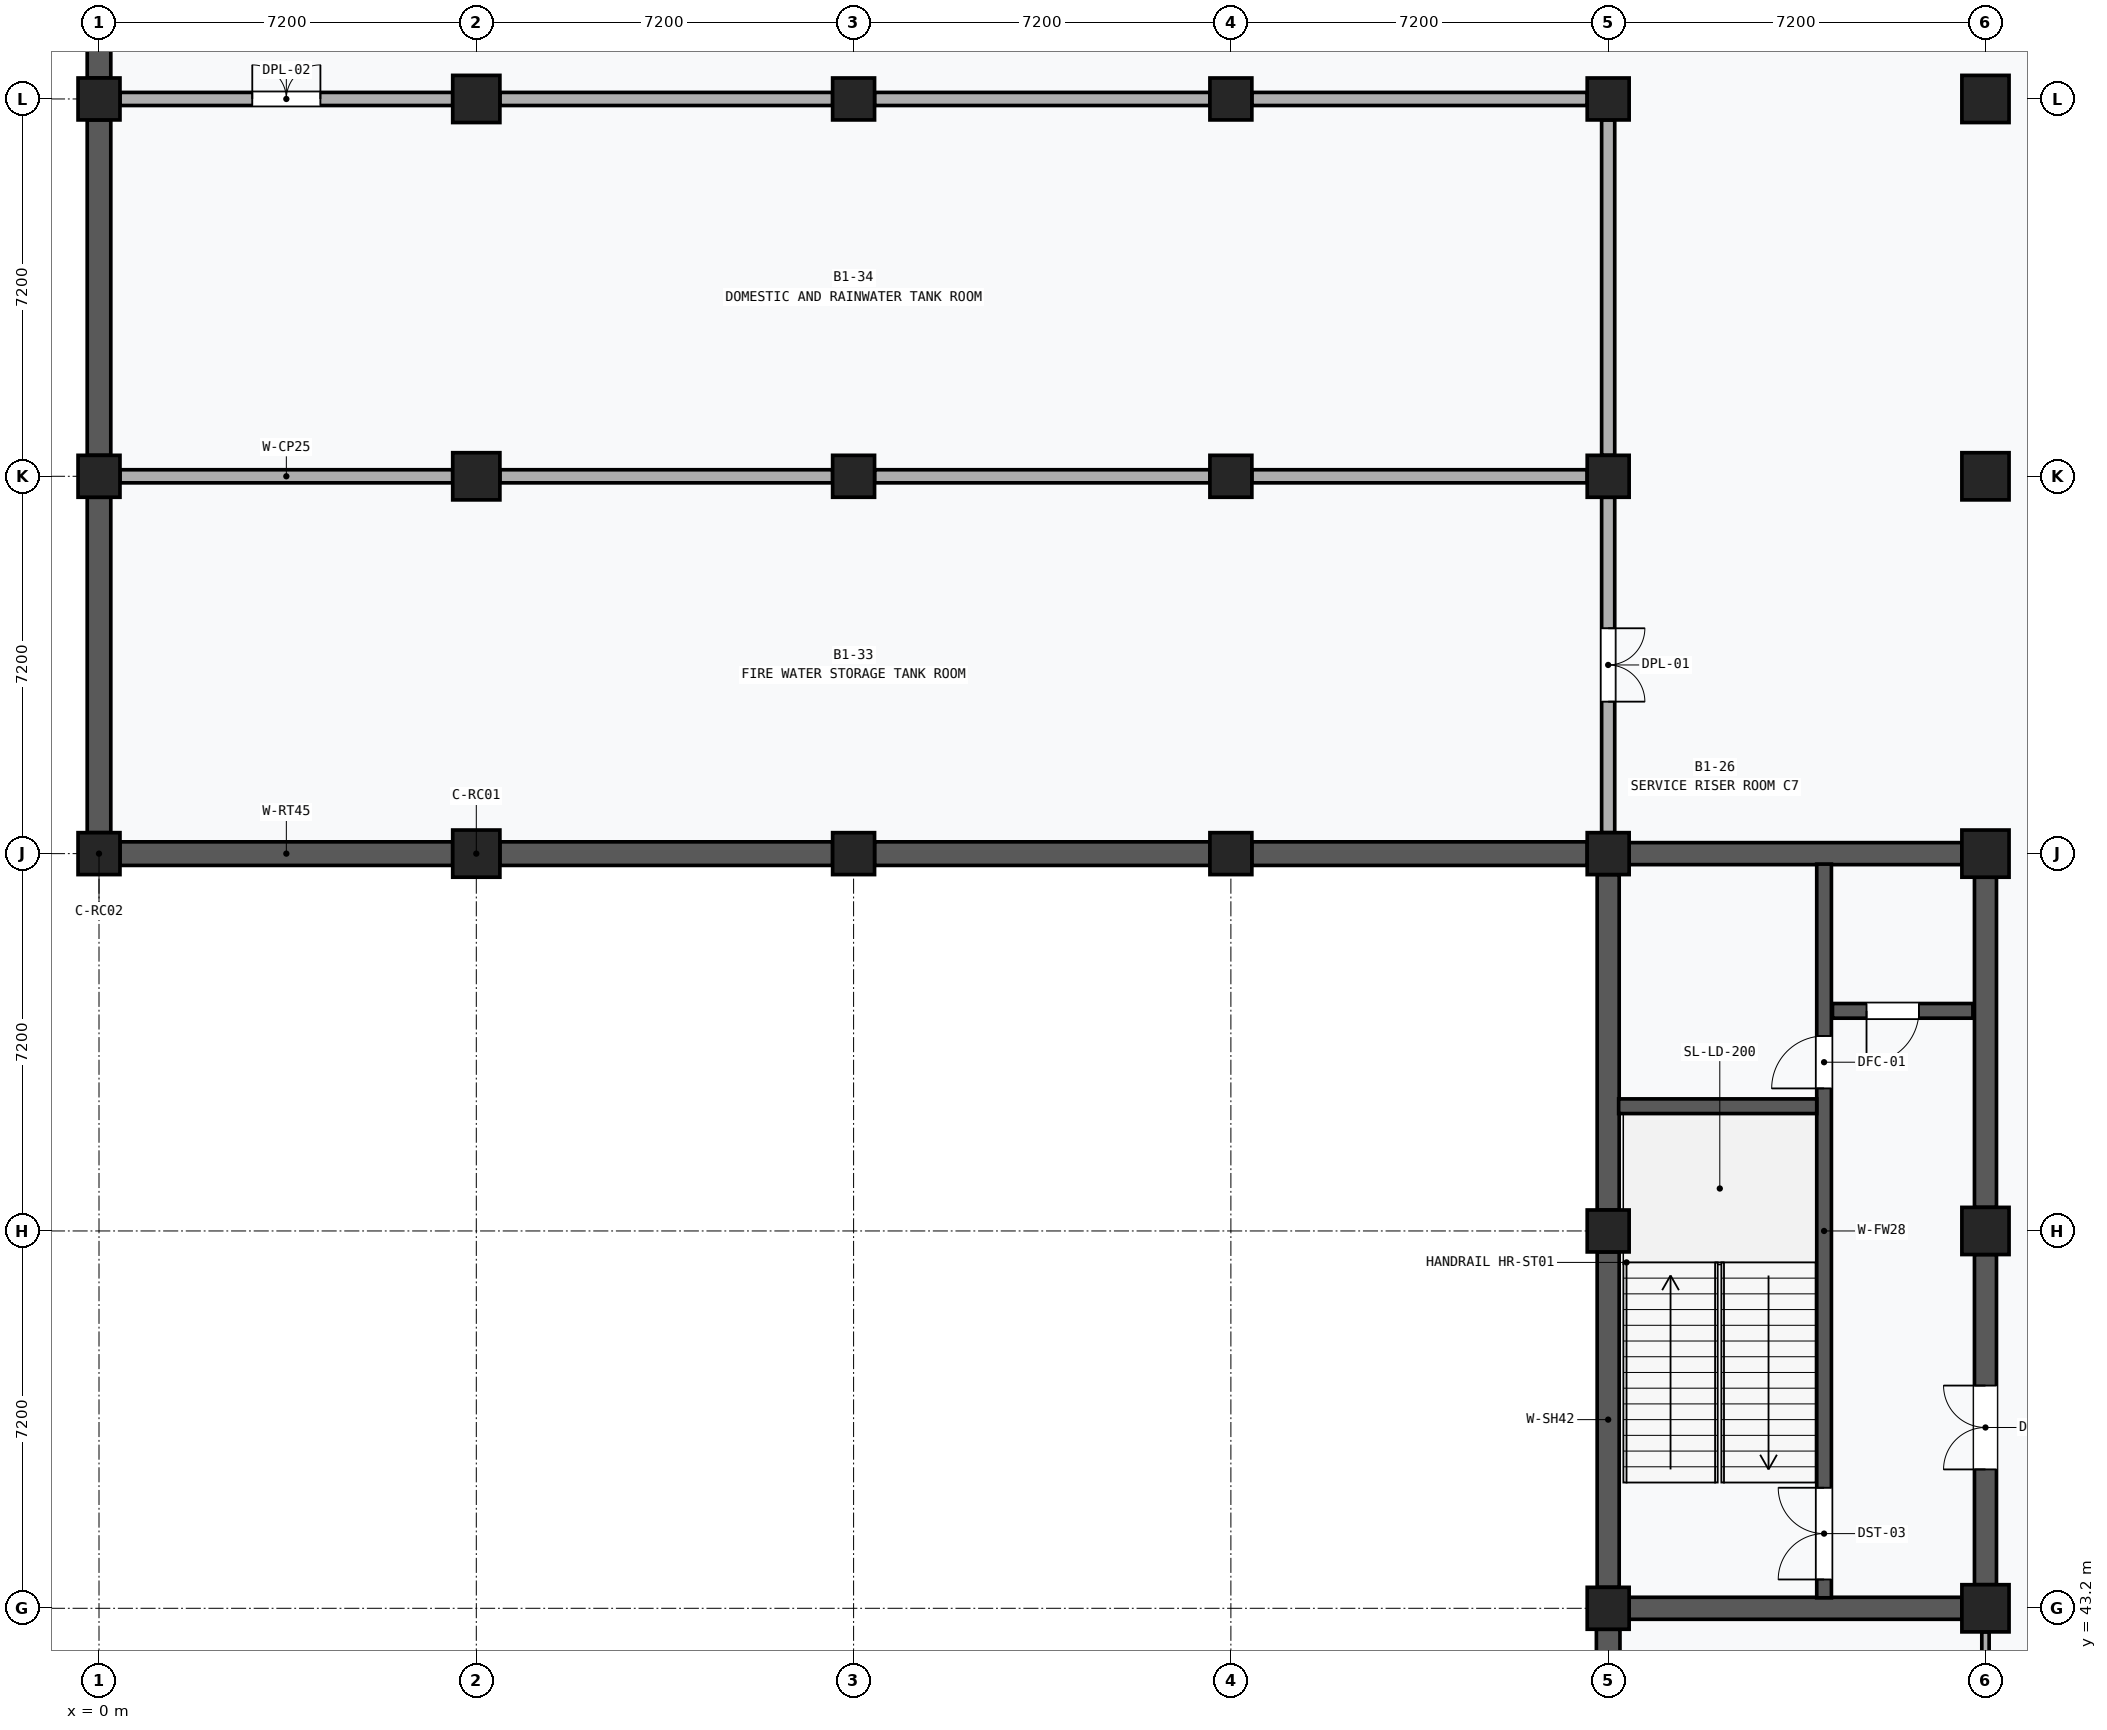
"""IFC4 building model, lengths in metres.
Left out: names, types, materials, properties, quantities, classifications, styles, units other than length and angle.
Written with IfcOpenShell. Run it as: python <this file> out.ifc"""

import sys

from ifc_helpers import new_model, si_unit, direction, frame, frame_2d, origin, origin_2d, place, context, subcontext, project, spatial, rectangle, extrude, element, fill, save


model = new_model("IFC4")
c1 = context("Model", 3, precision=1e-05, world=origin(), true_north=direction((0.0, 1.0)))
c2 = subcontext(c1, "Body", "Model", "MODEL_VIEW")
j1 = project(units=[si_unit("LENGTHUNIT", "METRE"), si_unit("PLANEANGLEUNIT", "RADIAN")], contexts=[c1])
p1 = place(None, origin())
s1 = spatial("IfcSite", under=j1, at=p1, CompositionType="ELEMENT")
p2 = place(p1, origin())
s2 = spatial("IfcBuilding", under=s1, at=p2, CompositionType="ELEMENT")
p3 = place(p2, frame((0.0, 0.0, -4.5)))
s3 = spatial("IfcBuildingStorey", under=s2, at=p3, CompositionType="ELEMENT", Elevation=-4.5)
for number, where, z_axis, x_axis in (
    (1, (0.0, 57.6, 0.0), (0.0, 0.0, 1.0), (1.0, 0.0, 0.0)),
    (2, (0.0, 64.8, 0.0), (0.0, 0.0, 1.0), (1.0, 0.0, 0.0)),
    (3, (0.0, 72.0, 0.0), (0.0, 0.0, 1.0), (1.0, 0.0, 0.0)),
):
    element("IfcColumn", number, at=place(p3, frame(where, z_axis=z_axis, x_axis=x_axis)), inside=s3, PredefinedType="COLUMN", context=c2, shape_type="SweptSolid", body=[
        extrude(rectangle(XDim=0.8, YDim=0.8, at=origin_2d()), origin(), (0.0, 0.0, 1.0), 4.5),
    ])
for number, where, z_axis, x_axis in (
    (4, (7.2, 57.6, 0.0), (0.0, 0.0, 1.0), (1.0, 0.0, 0.0)),
    (5, (7.2, 64.8, 0.0), (0.0, 0.0, 1.0), (1.0, 0.0, 0.0)),
    (6, (7.2, 72.0, 0.0), (0.0, 0.0, 1.0), (1.0, 0.0, 0.0)),
):
    element("IfcColumn", number, at=place(p3, frame(where, z_axis=z_axis, x_axis=x_axis)), inside=s3, PredefinedType="COLUMN", context=c2, shape_type="SweptSolid", body=[
        extrude(rectangle(XDim=0.9, YDim=0.9, at=origin_2d()), origin(), (0.0, 0.0, 1.0), 4.5),
    ])
for number, where, z_axis, x_axis in (
    (7, (14.4, 57.6, 0.0), (0.0, 0.0, 1.0), (1.0, 0.0, 0.0)),
    (8, (14.4, 64.8, 0.0), (0.0, 0.0, 1.0), (1.0, 0.0, 0.0)),
    (9, (14.4, 72.0, 0.0), (0.0, 0.0, 1.0), (1.0, 0.0, 0.0)),
    (10, (21.6, 57.6, 0.0), (0.0, 0.0, 1.0), (1.0, 0.0, 0.0)),
    (11, (21.6, 64.8, 0.0), (0.0, 0.0, 1.0), (1.0, 0.0, 0.0)),
    (12, (21.6, 72.0, 0.0), (0.0, 0.0, 1.0), (1.0, 0.0, 0.0)),
    (13, (28.8, 43.2, 0.0), (0.0, 0.0, 1.0), (1.0, 0.0, 0.0)),
    (14, (28.8, 50.4, 0.0), (0.0, 0.0, 1.0), (1.0, 0.0, 0.0)),
    (15, (28.8, 57.6, 0.0), (0.0, 0.0, 1.0), (1.0, 0.0, 0.0)),
    (16, (28.8, 64.8, 0.0), (0.0, 0.0, 1.0), (1.0, 0.0, 0.0)),
    (17, (28.8, 72.0, 0.0), (0.0, 0.0, 1.0), (1.0, 0.0, 0.0)),
):
    element("IfcColumn", number, at=place(p3, frame(where, z_axis=z_axis, x_axis=x_axis)), inside=s3, PredefinedType="COLUMN", context=c2, shape_type="SweptSolid", body=[
        extrude(rectangle(XDim=0.8, YDim=0.8, at=origin_2d()), origin(), (0.0, 0.0, 1.0), 4.5),
    ])
for number, where, z_axis, x_axis in (
    (18, (36.0, 43.2, 0.0), (0.0, 0.0, 1.0), (1.0, 0.0, 0.0)),
    (19, (36.0, 50.4, 0.0), (0.0, 0.0, 1.0), (1.0, 0.0, 0.0)),
    (20, (36.0, 57.6, 0.0), (0.0, 0.0, 1.0), (1.0, 0.0, 0.0)),
    (21, (36.0, 64.8, 0.0), (0.0, 0.0, 1.0), (1.0, 0.0, 0.0)),
    (22, (36.0, 72.0, 0.0), (0.0, 0.0, 1.0), (1.0, 0.0, 0.0)),
):
    element("IfcColumn", number, at=place(p3, frame(where, z_axis=z_axis, x_axis=x_axis)), inside=s3, PredefinedType="COLUMN", context=c2, shape_type="SweptSolid", body=[
        extrude(rectangle(XDim=0.9, YDim=0.9, at=origin_2d()), origin(), (0.0, 0.0, 1.0), 4.5),
    ])
p4 = place(p3, frame((0.4, 57.6, 0.0), z_axis=(0.0, 0.0, 1.0), x_axis=(1.0, 0.0, 0.0)))
e23 = element("IfcWall", 23, at=p4, inside=s3, PredefinedType="SOLIDWALL", context=c2, shape_type="SweptSolid", body=[
    extrude(rectangle(XDim=6.35, YDim=0.45, at=frame_2d((3.175, 0.0))), origin(), (0.0, 0.0, 1.0), 3.57),
])
p5 = place(p3, frame((0.0, 58.0, 0.0), z_axis=(0.0, 0.0, 1.0), x_axis=(0.0, 1.0, 0.0)))
e24 = element("IfcWall", 24, at=p5, inside=s3, PredefinedType="SOLIDWALL", context=c2, shape_type="SweptSolid", body=[
    extrude(rectangle(XDim=6.4, YDim=0.45, at=frame_2d((3.2, 0.0))), origin(), (0.0, 0.0, 1.0), 3.57),
])
for number, where, z_axis, x_axis in (
    (25, (0.0, 65.2, 0.0), (0.0, 0.0, 1.0), (0.0, 1.0, 0.0)),
    (26, (0.0, 72.4, 0.0), (0.0, 0.0, 1.0), (0.0, 1.0, 0.0)),
):
    element("IfcWall", number, at=place(p3, frame(where, z_axis=z_axis, x_axis=x_axis)), inside=s3, PredefinedType="SOLIDWALL", context=c2, shape_type="SweptSolid", body=[
        extrude(rectangle(XDim=6.4, YDim=0.45, at=frame_2d((3.2, 0.0))), origin(), (0.0, 0.0, 1.0), 3.57),
    ])
p6 = place(p3, frame((7.65, 57.6, 0.0), z_axis=(0.0, 0.0, 1.0), x_axis=(1.0, 0.0, 0.0)))
e27 = element("IfcWall", 27, at=p6, inside=s3, PredefinedType="SOLIDWALL", context=c2, shape_type="SweptSolid", body=[
    extrude(rectangle(XDim=6.35, YDim=0.45, at=frame_2d((3.175, 0.0))), origin(), (0.0, 0.0, 1.0), 3.57),
])
for number, where, z_axis, x_axis in (
    (28, (14.8, 57.6, 0.0), (0.0, 0.0, 1.0), (1.0, 0.0, 0.0)),
    (29, (22.0, 57.6, 0.0), (0.0, 0.0, 1.0), (1.0, 0.0, 0.0)),
):
    element("IfcWall", number, at=place(p3, frame(where, z_axis=z_axis, x_axis=x_axis)), inside=s3, PredefinedType="SOLIDWALL", context=c2, shape_type="SweptSolid", body=[
        extrude(rectangle(XDim=6.4, YDim=0.45, at=frame_2d((3.2, 0.0))), origin(), (0.0, 0.0, 1.0), 3.57),
    ])
p7 = place(p3, frame((28.8, 36.4, 0.0), z_axis=(0.0, 0.0, 1.0), x_axis=(0.0, 1.0, 0.0)))
e30 = element("IfcWall", 30, at=p7, inside=s3, PredefinedType="SOLIDWALL", context=c2, shape_type="SweptSolid", body=[
    extrude(rectangle(XDim=6.4, YDim=0.45, at=frame_2d((3.2, 0.0))), origin(), (0.0, 0.0, 1.0), 3.57),
])
for number, where, z_axis, x_axis in (
    (31, (28.8, 43.6, 0.0), (0.0, 0.0, 1.0), (0.0, 1.0, 0.0)),
    (32, (28.8, 50.8, 0.0), (0.0, 0.0, 1.0), (0.0, 1.0, 0.0)),
):
    element("IfcWall", number, at=place(p3, frame(where, z_axis=z_axis, x_axis=x_axis)), inside=s3, PredefinedType="SHEAR", context=c2, shape_type="SweptSolid", body=[
        extrude(rectangle(XDim=6.4, YDim=0.42, at=frame_2d((3.2, 0.0))), origin(), (0.0, 0.0, 1.0), 3.57),
    ])
p8 = place(p3, frame((36.0, 43.65, 0.0), z_axis=(0.0, 0.0, 1.0), x_axis=(0.0, 1.0, 0.0)))
e33 = element("IfcWall", 33, at=p8, inside=s3, PredefinedType="SHEAR", context=c2, shape_type="SweptSolid", body=[
    extrude(rectangle(XDim=6.3, YDim=0.42, at=frame_2d((3.15, 0.0))), origin(), (0.0, 0.0, 1.0), 3.3),
])
p9 = place(p8, frame((2.2, 0.0, 0.0)))
e34 = element("IfcOpeningElement", 34, at=p9, cuts=e33, PredefinedType="OPENING", context=c2, shape_type="SweptSolid", body=[
    extrude(rectangle(XDim=1.6, YDim=2.2, at=frame_2d((0.8, 1.1))), frame((0.0, 0.222, 0.0), z_axis=(0.0, -1.0, 0.0), x_axis=(1.0, 0.0, 0.0)), (0.0, 0.0, 1.0), 0.444),
])
p10 = place(p3, frame((36.0, 50.85, 0.0), z_axis=(0.0, 0.0, 1.0), x_axis=(0.0, 1.0, 0.0)))
e35 = element("IfcWall", 35, at=p10, inside=s3, PredefinedType="SHEAR", context=c2, shape_type="SweptSolid", body=[
    extrude(rectangle(XDim=6.3, YDim=0.42, at=frame_2d((3.15, 0.0))), origin(), (0.0, 0.0, 1.0), 3.3),
])
for number, where, z_axis, x_axis in (
    (36, (29.2, 43.2, 0.0), (0.0, 0.0, 1.0), (1.0, 0.0, 0.0)),
    (37, (29.2, 57.6, 0.0), (0.0, 0.0, 1.0), (1.0, 0.0, 0.0)),
):
    element("IfcWall", number, at=place(p3, frame(where, z_axis=z_axis, x_axis=x_axis)), inside=s3, PredefinedType="SHEAR", context=c2, shape_type="SweptSolid", body=[
        extrude(rectangle(XDim=6.35, YDim=0.42, at=frame_2d((3.175, 0.0))), origin(), (0.0, 0.0, 1.0), 3.3),
    ])
p11 = place(p3, frame((32.92, 43.4, 0.0), z_axis=(0.0, 0.0, 1.0), x_axis=(0.0, 1.0, 0.0)))
e38 = element("IfcWall", 38, at=p11, inside=s3, PredefinedType="SHEAR", context=c2, shape_type="SweptSolid", body=[
    extrude(rectangle(XDim=14.0, YDim=0.28, at=frame_2d((7.0, 0.0))), origin(), (0.0, 0.0, 1.0), 4.2),
])
p12 = place(p11, frame((0.35, 0.0, 0.0)))
e39 = element("IfcOpeningElement", 39, at=p12, cuts=e38, PredefinedType="OPENING", context=c2, shape_type="SweptSolid", body=[
    extrude(rectangle(XDim=1.75, YDim=2.15, at=frame_2d((0.875, 1.075))), frame((0.0, 0.152, 0.0), z_axis=(0.0, -1.0, 0.0), x_axis=(1.0, 0.0, 0.0)), (0.0, 0.0, 1.0), 0.304),
])
p13 = place(p11, frame((9.72, 0.0, 0.0)))
e40 = element("IfcOpeningElement", 40, at=p13, cuts=e38, PredefinedType="OPENING", context=c2, shape_type="SweptSolid", body=[
    extrude(rectangle(XDim=1.0, YDim=2.15, at=frame_2d((0.5, 1.075))), frame((0.0, 0.152, 0.0), z_axis=(0.0, -1.0, 0.0), x_axis=(1.0, 0.0, 0.0)), (0.0, 0.0, 1.0), 0.304),
])
p14 = place(p3, frame((29.0, 52.78, 0.0), z_axis=(0.0, 0.0, 1.0), x_axis=(1.0, 0.0, 0.0)))
e41 = element("IfcWall", 41, at=p14, inside=s3, PredefinedType="SHEAR", context=c2, shape_type="SweptSolid", body=[
    extrude(rectangle(XDim=3.78, YDim=0.28, at=frame_2d((1.89, 0.0))), origin(), (0.0, 0.0, 1.0), 4.2),
])
p15 = place(p3, frame((33.08, 54.6, 0.0), z_axis=(0.0, 0.0, 1.0), x_axis=(1.0, 0.0, 0.0)))
e42 = element("IfcWall", 42, at=p15, inside=s3, PredefinedType="SHEAR", context=c2, shape_type="SweptSolid", body=[
    extrude(rectangle(XDim=2.68, YDim=0.28, at=frame_2d((1.34, 0.0))), origin(), (0.0, 0.0, 1.0), 4.2),
])
p16 = place(p15, frame((0.65, 0.0, 0.0)))
e43 = element("IfcOpeningElement", 43, at=p16, cuts=e42, PredefinedType="OPENING", context=c2, shape_type="SweptSolid", body=[
    extrude(rectangle(XDim=1.0, YDim=2.15, at=frame_2d((0.5, 1.075))), frame((0.0, 0.152, 0.0), z_axis=(0.0, -1.0, 0.0), x_axis=(1.0, 0.0, 0.0)), (0.0, 0.0, 1.0), 0.304),
])
for number, where, z_axis, x_axis in (
    (44, (0.4, 64.8, 0.0), (0.0, 0.0, 1.0), (1.0, 0.0, 0.0)),
    (45, (7.65, 64.8, 0.0), (0.0, 0.0, 1.0), (1.0, 0.0, 0.0)),
):
    element("IfcWall", number, at=place(p3, frame(where, z_axis=z_axis, x_axis=x_axis)), inside=s3, PredefinedType="PARTITIONING", context=c2, shape_type="SweptSolid", body=[
        extrude(rectangle(XDim=6.35, YDim=0.25, at=frame_2d((3.175, 0.0))), origin(), (0.0, 0.0, 1.0), 3.3),
    ])
for number, where, z_axis, x_axis in (
    (46, (14.8, 64.8, 0.0), (0.0, 0.0, 1.0), (1.0, 0.0, 0.0)),
    (47, (22.0, 64.8, 0.0), (0.0, 0.0, 1.0), (1.0, 0.0, 0.0)),
):
    element("IfcWall", number, at=place(p3, frame(where, z_axis=z_axis, x_axis=x_axis)), inside=s3, PredefinedType="PARTITIONING", context=c2, shape_type="SweptSolid", body=[
        extrude(rectangle(XDim=6.4, YDim=0.25, at=frame_2d((3.2, 0.0))), origin(), (0.0, 0.0, 1.0), 3.3),
    ])
p17 = place(p3, frame((28.8, 58.0, 0.0), z_axis=(0.0, 0.0, 1.0), x_axis=(0.0, 1.0, 0.0)))
e48 = element("IfcWall", 48, at=p17, inside=s3, PredefinedType="PARTITIONING", context=c2, shape_type="SweptSolid", body=[
    extrude(rectangle(XDim=6.4, YDim=0.25, at=frame_2d((3.2, 0.0))), origin(), (0.0, 0.0, 1.0), 3.3),
])
p18 = place(p17, frame((2.5, 0.0, 0.0)))
e49 = element("IfcOpeningElement", 49, at=p18, cuts=e48, PredefinedType="OPENING", context=c2, shape_type="SweptSolid", body=[
    extrude(rectangle(XDim=1.4, YDim=2.25, at=frame_2d((0.7, 1.125))), frame((0.0, 0.137, 0.0), z_axis=(0.0, -1.0, 0.0), x_axis=(1.0, 0.0, 0.0)), (0.0, 0.0, 1.0), 0.274),
])
p19 = place(p3, frame((0.4, 72.0, 0.0), z_axis=(0.0, 0.0, 1.0), x_axis=(1.0, 0.0, 0.0)))
e50 = element("IfcWall", 50, at=p19, inside=s3, PredefinedType="PARTITIONING", context=c2, shape_type="SweptSolid", body=[
    extrude(rectangle(XDim=6.35, YDim=0.25, at=frame_2d((3.175, 0.0))), origin(), (0.0, 0.0, 1.0), 3.3),
])
p20 = place(p19, frame((2.525, 0.0, 0.0)))
e51 = element("IfcOpeningElement", 51, at=p20, cuts=e50, PredefinedType="OPENING", context=c2, shape_type="SweptSolid", body=[
    extrude(rectangle(XDim=1.3, YDim=2.2, at=frame_2d((0.65, 1.1))), frame((0.0, 0.137, 0.0), z_axis=(0.0, -1.0, 0.0), x_axis=(1.0, 0.0, 0.0)), (0.0, 0.0, 1.0), 0.274),
])
p21 = place(p3, frame((7.65, 72.0, 0.0), z_axis=(0.0, 0.0, 1.0), x_axis=(1.0, 0.0, 0.0)))
e52 = element("IfcWall", 52, at=p21, inside=s3, PredefinedType="PARTITIONING", context=c2, shape_type="SweptSolid", body=[
    extrude(rectangle(XDim=6.35, YDim=0.25, at=frame_2d((3.175, 0.0))), origin(), (0.0, 0.0, 1.0), 3.3),
])
for number, where, z_axis, x_axis in (
    (53, (14.8, 72.0, 0.0), (0.0, 0.0, 1.0), (1.0, 0.0, 0.0)),
    (54, (22.0, 72.0, 0.0), (0.0, 0.0, 1.0), (1.0, 0.0, 0.0)),
):
    element("IfcWall", number, at=place(p3, frame(where, z_axis=z_axis, x_axis=x_axis)), inside=s3, PredefinedType="PARTITIONING", context=c2, shape_type="SweptSolid", body=[
        extrude(rectangle(XDim=6.4, YDim=0.25, at=frame_2d((3.2, 0.0))), origin(), (0.0, 0.0, 1.0), 3.3),
    ])
p22 = place(p3, frame((28.8, 65.2, 0.0), z_axis=(0.0, 0.0, 1.0), x_axis=(0.0, 1.0, 0.0)))
e55 = element("IfcWall", 55, at=p22, inside=s3, PredefinedType="PARTITIONING", context=c2, shape_type="SweptSolid", body=[
    extrude(rectangle(XDim=6.4, YDim=0.25, at=frame_2d((3.2, 0.0))), origin(), (0.0, 0.0, 1.0), 3.3),
])
p23 = place(p3, frame((36.0, 36.45, 0.0), z_axis=(0.0, 0.0, 1.0), x_axis=(0.0, 1.0, 0.0)))
e56 = element("IfcWall", 56, at=p23, inside=s3, PredefinedType="PARTITIONING", context=c2, shape_type="SweptSolid", body=[
    extrude(rectangle(XDim=6.3, YDim=0.14, at=frame_2d((3.15, 0.0))), origin(), (0.0, 0.0, 1.0), 3.3),
])
p24 = place(p9, origin())
e57 = element("IfcDoor", 57, at=p24, inside=s3, OperationType="DOUBLE_DOOR_SINGLE_SWING", PredefinedType="DOOR", context=c2, shape_type="SweptSolid", body=[
    extrude(rectangle(XDim=1.6, YDim=2.2, at=frame_2d((0.8, 1.1))), frame((0.0, 0.025, 0.0), z_axis=(0.0, -1.0, 0.0), x_axis=(1.0, 0.0, 0.0)), (0.0, 0.0, 1.0), 0.05),
])
fill(e34, e57)
p25 = place(p12, origin())
e58 = element("IfcDoor", 58, at=p25, inside=s3, OperationType="DOUBLE_DOOR_SINGLE_SWING", PredefinedType="DOOR", context=c2, shape_type="SweptSolid", body=[
    extrude(rectangle(XDim=1.75, YDim=2.15, at=frame_2d((0.875, 1.075))), frame((0.0, 0.025, 0.0), z_axis=(0.0, -1.0, 0.0), x_axis=(1.0, 0.0, 0.0)), (0.0, 0.0, 1.0), 0.05),
])
fill(e39, e58)
p26 = place(p13, origin())
e59 = element("IfcDoor", 59, at=p26, inside=s3, OperationType="SINGLE_SWING_LEFT", PredefinedType="DOOR", context=c2, shape_type="SweptSolid", body=[
    extrude(rectangle(XDim=1.0, YDim=2.15, at=frame_2d((0.5, 1.075))), frame((0.0, 0.025, 0.0), z_axis=(0.0, -1.0, 0.0), x_axis=(1.0, 0.0, 0.0)), (0.0, 0.0, 1.0), 0.05),
])
fill(e40, e59)
p27 = place(p16, frame((1.0, 0.0, 0.0), z_axis=(0.0, 0.0, 1.0), x_axis=(-1.0, 0.0, 0.0)))
e60 = element("IfcDoor", 60, at=p27, inside=s3, OperationType="SINGLE_SWING_RIGHT", PredefinedType="DOOR", context=c2, shape_type="SweptSolid", body=[
    extrude(rectangle(XDim=1.0, YDim=2.15, at=frame_2d((0.5, 1.075))), frame((0.0, 0.025, 0.0), z_axis=(0.0, -1.0, 0.0), x_axis=(1.0, 0.0, 0.0)), (0.0, 0.0, 1.0), 0.05),
])
fill(e43, e60)
p28 = place(p18, frame((1.4, 0.0, 0.0), z_axis=(0.0, 0.0, 1.0), x_axis=(-1.0, 0.0, 0.0)))
e61 = element("IfcDoor", 61, at=p28, inside=s3, OperationType="DOUBLE_DOOR_SINGLE_SWING", PredefinedType="DOOR", context=c2, shape_type="SweptSolid", body=[
    extrude(rectangle(XDim=1.4, YDim=2.25, at=frame_2d((0.7, 1.125))), frame((0.0, 0.025, 0.0), z_axis=(0.0, -1.0, 0.0), x_axis=(1.0, 0.0, 0.0)), (0.0, 0.0, 1.0), 0.05),
])
fill(e49, e61)
p29 = place(p20, origin())
e62 = element("IfcDoor", 62, at=p29, inside=s3, OperationType="DOUBLE_DOOR_SINGLE_SWING", PredefinedType="DOOR", context=c2, shape_type="SweptSolid", body=[
    extrude(rectangle(XDim=1.3, YDim=2.2, at=frame_2d((0.65, 1.1))), frame((0.0, 0.025, 0.0), z_axis=(0.0, -1.0, 0.0), x_axis=(1.0, 0.0, 0.0)), (0.0, 0.0, 1.0), 0.05),
])
fill(e51, e62)
save(model, sys.argv[1])
